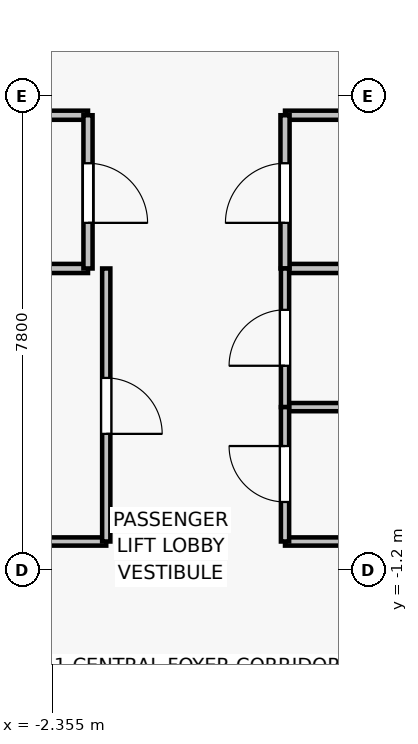
"""IFC4 building model, lengths in metres.
Left out: names, types, materials, properties, quantities, classifications, styles, units other than length and angle.
Written with IfcOpenShell. Run it as: python <this file> out.ifc"""

import sys

from ifc_helpers import new_model, si_unit, direction, frame, frame_2d, origin, place, context, subcontext, project, spatial, rectangle, extrude, source, transform, mapped, element, fill, save


model = new_model("IFC4")
c1 = context("Model", 3, precision=1e-05, world=origin(), true_north=direction((0.0, 1.0)))
c2 = subcontext(c1, "Body", "Model", "MODEL_VIEW")
j1 = project(units=[si_unit("LENGTHUNIT", "METRE"), si_unit("PLANEANGLEUNIT", "RADIAN")], contexts=[c1])
p1 = place(None, origin())
s1 = spatial("IfcSite", under=j1, at=p1, CompositionType="ELEMENT")
p2 = place(p1, origin())
s2 = spatial("IfcBuilding", under=s1, at=p2, CompositionType="ELEMENT")
p3 = place(p2, frame((0.0, 0.0, 251.8)))
s3 = spatial("IfcBuildingStorey", under=s2, at=p3, CompositionType="ELEMENT", Elevation=251.8)
for number, where, z_axis, x_axis in (
    (1, (-1.77, 3.76, 0.0), (0.0, 0.0, 1.0), (-1.0, 0.0, 0.0)),
    (2, (-6.18, 6.28, 0.0), (0.0, 0.0, 1.0), (1.0, 0.0, 0.0)),
):
    element("IfcWall", number, at=place(p3, frame(where, z_axis=z_axis, x_axis=x_axis)), inside=s3, PredefinedType="PARTITIONING", context=c2, shape_type="SweptSolid", body=[
        extrude(rectangle(XDim=4.41, YDim=0.15, at=frame_2d((2.205, 0.0))), origin(), (0.0, 0.0, 1.0), 3.075),
    ])
p4 = place(p3, frame((-1.77, 6.28, 0.0), z_axis=(0.0, 0.0, 1.0), x_axis=(0.0, -1.0, 0.0)))
e3 = element("IfcWall", 3, at=p4, inside=s3, PredefinedType="PARTITIONING", context=c2, shape_type="SweptSolid", body=[
    extrude(rectangle(XDim=2.52, YDim=0.15, at=frame_2d((1.26, 0.0))), origin(), (0.0, 0.0, 1.0), 3.075),
])
p5 = place(p4, frame((0.79, 0.0, 0.0)))
e4 = element("IfcOpeningElement", 4, at=p5, cuts=e3, PredefinedType="OPENING", context=c2, shape_type="SweptSolid", body=[
    extrude(rectangle(XDim=0.98, YDim=2.15, at=frame_2d((0.49, 1.075))), frame((0.0, 0.085, 0.0), z_axis=(0.0, -1.0, 0.0), x_axis=(1.0, 0.0, 0.0)), (0.0, 0.0, 1.0), 0.17),
])
for number, where, z_axis, x_axis in (
    (5, (6.38, 3.76, 0.0), (0.0, 0.0, 1.0), (-1.0, 0.0, 0.0)),
    (6, (1.47, 6.28, 0.0), (0.0, 0.0, 1.0), (1.0, 0.0, 0.0)),
):
    element("IfcWall", number, at=place(p3, frame(where, z_axis=z_axis, x_axis=x_axis)), inside=s3, PredefinedType="PARTITIONING", context=c2, shape_type="SweptSolid", body=[
        extrude(rectangle(XDim=4.91, YDim=0.15, at=frame_2d((2.455, 0.0))), origin(), (0.0, 0.0, 1.0), 3.075),
    ])
p6 = place(p3, frame((1.47, 3.76, 0.0), z_axis=(0.0, 0.0, 1.0), x_axis=(0.0, 1.0, 0.0)))
e7 = element("IfcWall", 7, at=p6, inside=s3, PredefinedType="PARTITIONING", context=c2, shape_type="SweptSolid", body=[
    extrude(rectangle(XDim=2.52, YDim=0.15, at=frame_2d((1.26, 0.0))), origin(), (0.0, 0.0, 1.0), 3.075),
])
p7 = place(p6, frame((0.75, 0.0, 0.0)))
e8 = element("IfcOpeningElement", 8, at=p7, cuts=e7, PredefinedType="OPENING", context=c2, shape_type="SweptSolid", body=[
    extrude(rectangle(XDim=0.98, YDim=2.15, at=frame_2d((0.49, 1.075))), frame((0.0, 0.085, 0.0), z_axis=(0.0, -1.0, 0.0), x_axis=(1.0, 0.0, 0.0)), (0.0, 0.0, 1.0), 0.17),
])
p8 = place(p3, frame((-1.47, -0.73, 0.0), z_axis=(0.0, 0.0, 1.0), x_axis=(-1.0, 0.0, 0.0)))
e9 = element("IfcWall", 9, at=p8, inside=s3, PredefinedType="PARTITIONING", context=c2, shape_type="SweptSolid", body=[
    extrude(rectangle(XDim=5.11, YDim=0.135, at=frame_2d((2.555, 0.0))), origin(), (0.0, 0.0, 1.0), 3.075),
])
p9 = place(p3, frame((-1.47, 3.76, 0.0), z_axis=(0.0, 0.0, 1.0), x_axis=(0.0, -1.0, 0.0)))
e10 = element("IfcWall", 10, at=p9, inside=s3, PredefinedType="PARTITIONING", context=c2, shape_type="SweptSolid", body=[
    extrude(rectangle(XDim=4.49, YDim=0.135, at=frame_2d((2.245, 0.0))), origin(), (0.0, 0.0, 1.0), 3.075),
])
p10 = place(p9, frame((1.8, 0.0, 0.0)))
e11 = element("IfcOpeningElement", 11, at=p10, cuts=e10, PredefinedType="OPENING", context=c2, shape_type="SweptSolid", body=[
    extrude(rectangle(XDim=0.92, YDim=2.1, at=frame_2d((0.46, 1.05))), frame((0.0, 0.077, 0.0), z_axis=(0.0, -1.0, 0.0), x_axis=(1.0, 0.0, 0.0)), (0.0, 0.0, 1.0), 0.155),
])
p11 = place(p3, frame((6.58, 1.48, 0.0), z_axis=(0.0, 0.0, 1.0), x_axis=(-1.0, 0.0, 0.0)))
e12 = element("IfcWall", 12, at=p11, inside=s3, PredefinedType="PARTITIONING", context=c2, shape_type="SweptSolid", body=[
    extrude(rectangle(XDim=5.11, YDim=0.135, at=frame_2d((2.555, 0.0))), origin(), (0.0, 0.0, 1.0), 3.075),
])
p12 = place(p3, frame((1.47, 1.48, 0.0), z_axis=(0.0, 0.0, 1.0), x_axis=(0.0, 1.0, 0.0)))
e13 = element("IfcWall", 13, at=p12, inside=s3, PredefinedType="PARTITIONING", context=c2, shape_type="SweptSolid", body=[
    extrude(rectangle(XDim=2.28, YDim=0.135, at=frame_2d((1.14, 0.0))), origin(), (0.0, 0.0, 1.0), 3.075),
])
p13 = place(p12, frame((0.68, 0.0, 0.0)))
e14 = element("IfcOpeningElement", 14, at=p13, cuts=e13, PredefinedType="OPENING", context=c2, shape_type="SweptSolid", body=[
    extrude(rectangle(XDim=0.92, YDim=2.1, at=frame_2d((0.46, 1.05))), frame((0.0, 0.077, 0.0), z_axis=(0.0, -1.0, 0.0), x_axis=(1.0, 0.0, 0.0)), (0.0, 0.0, 1.0), 0.155),
])
p14 = place(p3, frame((4.18, -0.73, 0.0), z_axis=(0.0, 0.0, 1.0), x_axis=(-1.0, 0.0, 0.0)))
e15 = element("IfcWall", 15, at=p14, inside=s3, PredefinedType="PARTITIONING", context=c2, shape_type="SweptSolid", body=[
    extrude(rectangle(XDim=2.71, YDim=0.135, at=frame_2d((1.355, 0.0))), origin(), (0.0, 0.0, 1.0), 3.075),
])
p15 = place(p3, frame((1.47, -0.73, 0.0), z_axis=(0.0, 0.0, 1.0), x_axis=(0.0, 1.0, 0.0)))
e16 = element("IfcWall", 16, at=p15, inside=s3, PredefinedType="PARTITIONING", context=c2, shape_type="SweptSolid", body=[
    extrude(rectangle(XDim=2.21, YDim=0.135, at=frame_2d((1.105, 0.0))), origin(), (0.0, 0.0, 1.0), 3.075),
])
p16 = place(p15, frame((0.65, 0.0, 0.0)))
e17 = element("IfcOpeningElement", 17, at=p16, cuts=e16, PredefinedType="OPENING", context=c2, shape_type="SweptSolid", body=[
    extrude(rectangle(XDim=0.92, YDim=2.1, at=frame_2d((0.46, 1.05))), frame((0.0, 0.077, 0.0), z_axis=(0.0, -1.0, 0.0), x_axis=(1.0, 0.0, 0.0)), (0.0, 0.0, 1.0), 0.155),
])
m1 = source(origin(), c2, "Body", "SweptSolid", [
    extrude(rectangle(XDim=0.98, YDim=2.15, at=frame_2d((0.49, 1.075))), frame((0.0, 0.025, 0.0), z_axis=(0.0, -1.0, 0.0), x_axis=(1.0, 0.0, 0.0)), (0.0, 0.0, 1.0), 0.05),
])
p17 = place(p5, origin())
e18 = element("IfcDoor", 18, at=p17, inside=s3, OperationType="SINGLE_SWING_RIGHT", PredefinedType="DOOR", context=c2, shape_type="MappedRepresentation", body=[
    mapped(m1, transform((0.0, 0.0, 0.0), x_axis=(1.0, 0.0, 0.0), y_axis=(0.0, 1.0, 0.0), z_axis=(0.0, 0.0, 1.0), scale=1.0)),
])
fill(e4, e18)
p18 = place(p7, origin())
e19 = element("IfcDoor", 19, at=p18, inside=s3, OperationType="SINGLE_SWING_LEFT", PredefinedType="DOOR", context=c2, shape_type="MappedRepresentation", body=[
    mapped(m1, transform((0.0, 0.0, 0.0), x_axis=(1.0, 0.0, 0.0), y_axis=(0.0, 1.0, 0.0), z_axis=(0.0, 0.0, 1.0), scale=1.0)),
])
fill(e8, e19)
m2 = source(origin(), c2, "Body", "SweptSolid", [
    extrude(rectangle(XDim=0.92, YDim=2.1, at=frame_2d((0.46, 1.05))), frame((0.0, 0.025, 0.0), z_axis=(0.0, -1.0, 0.0), x_axis=(1.0, 0.0, 0.0)), (0.0, 0.0, 1.0), 0.05),
])
p19 = place(p10, origin())
e20 = element("IfcDoor", 20, at=p19, inside=s3, OperationType="SINGLE_SWING_RIGHT", PredefinedType="DOOR", context=c2, shape_type="MappedRepresentation", body=[
    mapped(m2, transform((0.0, 0.0, 0.0), x_axis=(1.0, 0.0, 0.0), y_axis=(0.0, 1.0, 0.0), z_axis=(0.0, 0.0, 1.0), scale=1.0)),
])
fill(e11, e20)
p20 = place(p13, origin())
e21 = element("IfcDoor", 21, at=p20, inside=s3, OperationType="SINGLE_SWING_LEFT", PredefinedType="DOOR", context=c2, shape_type="MappedRepresentation", body=[
    mapped(m2, transform((0.0, 0.0, 0.0), x_axis=(1.0, 0.0, 0.0), y_axis=(0.0, 1.0, 0.0), z_axis=(0.0, 0.0, 1.0), scale=1.0)),
])
fill(e14, e21)
p21 = place(p16, origin())
e22 = element("IfcDoor", 22, at=p21, inside=s3, OperationType="SINGLE_SWING_RIGHT", PredefinedType="DOOR", context=c2, shape_type="MappedRepresentation", body=[
    mapped(m2, transform((0.0, 0.0, 0.0), x_axis=(1.0, 0.0, 0.0), y_axis=(0.0, 1.0, 0.0), z_axis=(0.0, 0.0, 1.0), scale=1.0)),
])
fill(e17, e22)
save(model, sys.argv[1])
